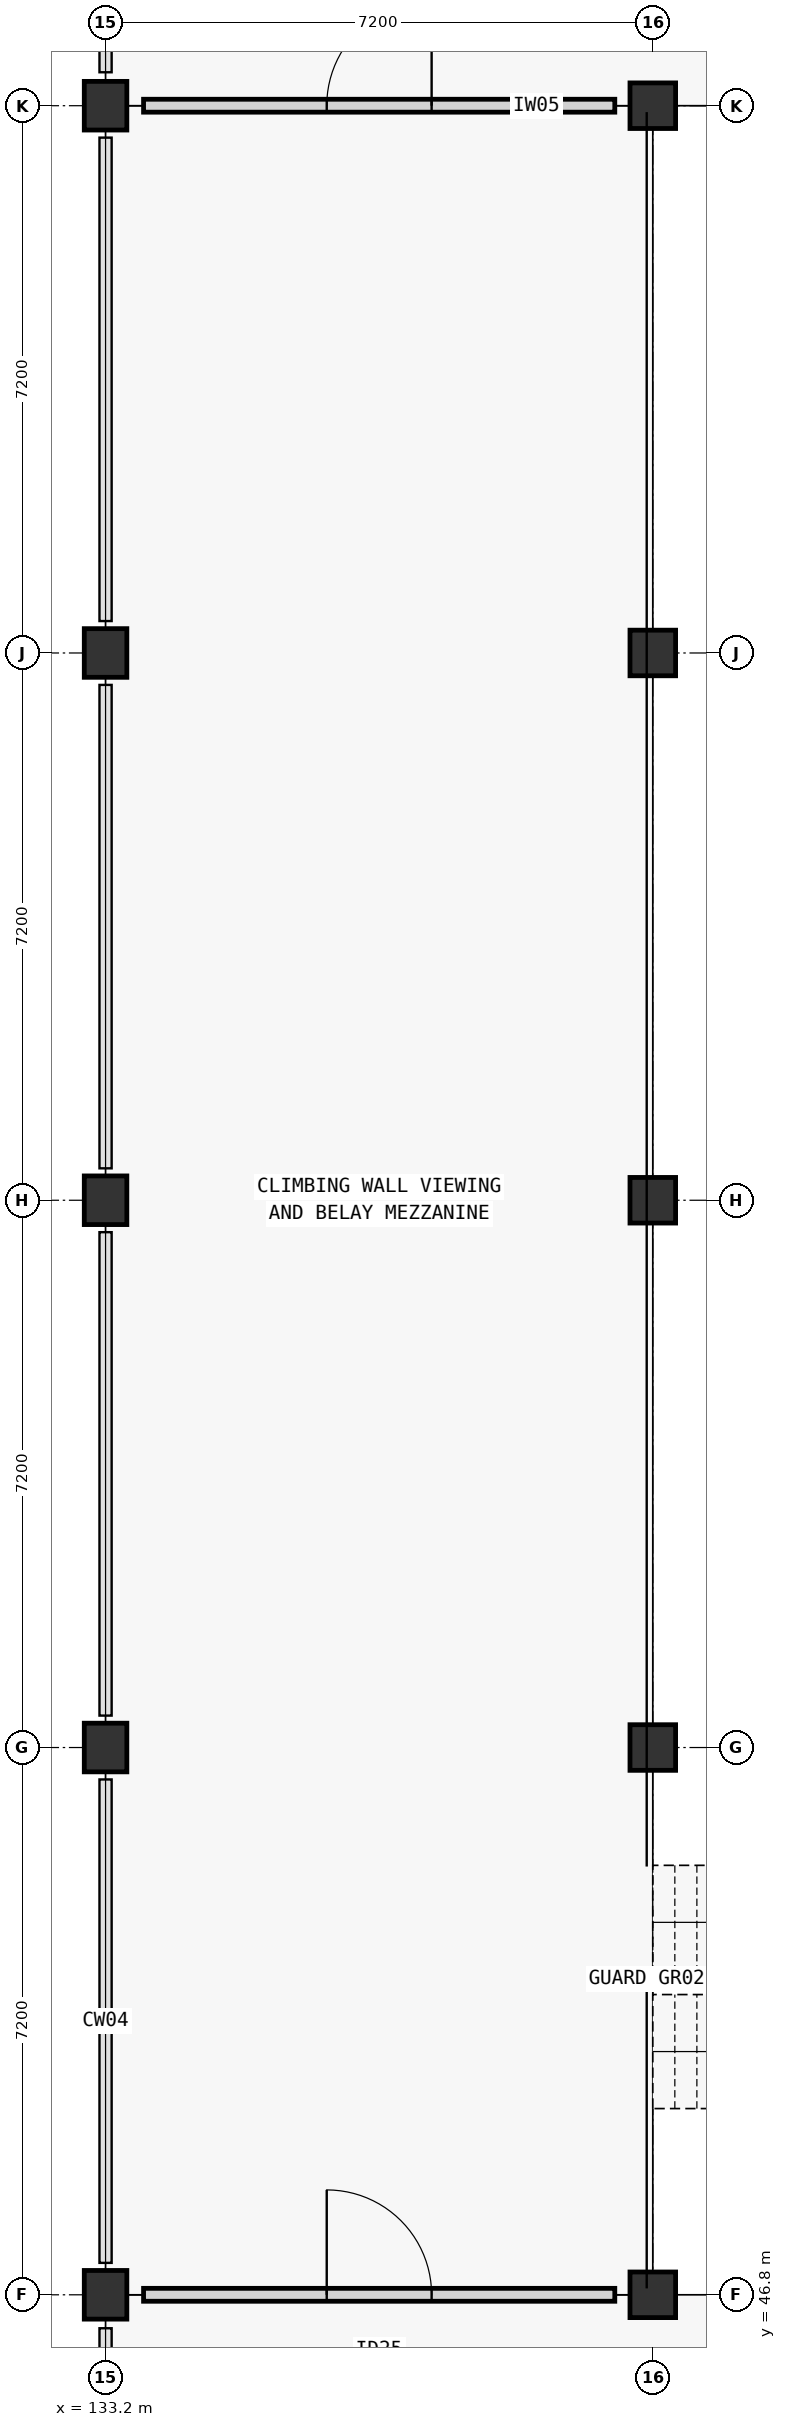
"""IFC4 building model, lengths in metres.
Left out: names, types, materials, properties, quantities, classifications, styles, units other than length and angle.
Written with IfcOpenShell. Run it as: python <this file> out.ifc"""

import sys

from ifc_helpers import new_model, si_unit, direction, frame, frame_2d, origin, origin_2d, place, context, subcontext, project, spatial, rectangle, extrude, element, fill, save


model = new_model("IFC4")
c1 = context("Model", 3, precision=1e-05, world=origin(), true_north=direction((0.0, 1.0)))
c2 = subcontext(c1, "Body", "Model", "MODEL_VIEW")
j1 = project(units=[si_unit("LENGTHUNIT", "METRE"), si_unit("PLANEANGLEUNIT", "RADIAN")], contexts=[c1])
p1 = place(None, origin())
s1 = spatial("IfcSite", under=j1, at=p1, CompositionType="ELEMENT")
p2 = place(p1, origin())
s2 = spatial("IfcBuilding", under=s1, at=p2, CompositionType="ELEMENT")
p3 = place(p2, frame((0.0, 0.0, 5.4)))
s3 = spatial("IfcBuildingStorey", under=s2, at=p3, CompositionType="ELEMENT", Elevation=5.4)
for number, where, z_axis, x_axis in (
    (1, (133.2, 46.8, 0.0), (0.0, 0.0, 1.0), (1.0, 0.0, 0.0)),
    (2, (133.2, 54.0, 0.0), (0.0, 0.0, 1.0), (1.0, 0.0, 0.0)),
    (3, (133.2, 61.2, 0.0), (0.0, 0.0, 1.0), (1.0, 0.0, 0.0)),
    (4, (133.2, 68.4, 0.0), (0.0, 0.0, 1.0), (1.0, 0.0, 0.0)),
    (5, (133.2, 75.6, 0.0), (0.0, 0.0, 1.0), (1.0, 0.0, 0.0)),
):
    element("IfcColumn", number, at=place(p3, frame(where, z_axis=z_axis, x_axis=x_axis)), inside=s3, PredefinedType="COLUMN", context=c2, shape_type="SweptSolid", body=[
        extrude(rectangle(XDim=0.56, YDim=0.64, at=origin_2d()), origin(), (0.0, 0.0, 1.0), 5.4),
    ])
for number, where, z_axis, x_axis in (
    (6, (140.4, 46.8, 0.0), (0.0, 0.0, 1.0), (1.0, 0.0, 0.0)),
    (7, (140.4, 54.0, 0.0), (0.0, 0.0, 1.0), (1.0, 0.0, 0.0)),
    (8, (140.4, 61.2, 0.0), (0.0, 0.0, 1.0), (1.0, 0.0, 0.0)),
    (9, (140.4, 68.4, 0.0), (0.0, 0.0, 1.0), (1.0, 0.0, 0.0)),
    (10, (140.4, 75.6, 0.0), (0.0, 0.0, 1.0), (1.0, 0.0, 0.0)),
):
    element("IfcColumn", number, at=place(p3, frame(where, z_axis=z_axis, x_axis=x_axis)), inside=s3, PredefinedType="COLUMN", context=c2, shape_type="SweptSolid", body=[
        extrude(rectangle(XDim=0.6, YDim=0.6, at=origin_2d()), origin(), (0.0, 0.0, 1.0), 5.4),
    ])
p4 = place(p3, frame((133.7, 46.8, 0.0), z_axis=(0.0, 0.0, 1.0), x_axis=(1.0, 0.0, 0.0)))
e11 = element("IfcWall", 11, at=p4, inside=s3, PredefinedType="STANDARD", context=c2, shape_type="SweptSolid", body=[
    extrude(rectangle(XDim=6.2, YDim=0.17, at=frame_2d((3.1, 0.0))), origin(), (0.0, 0.0, 1.0), 4.22),
])
p5 = place(p4, frame((2.41, 0.0, 0.0)))
e12 = element("IfcOpeningElement", 12, at=p5, cuts=e11, PredefinedType="OPENING", context=c2, shape_type="SweptSolid", body=[
    extrude(rectangle(XDim=1.38, YDim=2.2, at=frame_2d((0.69, 1.1))), frame((0.0, 0.085, 0.0), z_axis=(0.0, -1.0, 0.0), x_axis=(1.0, 0.0, 0.0)), (0.0, 0.0, 1.0), 0.17),
])
p6 = place(p3, frame((133.7, 75.6, 0.0), z_axis=(0.0, 0.0, 1.0), x_axis=(1.0, 0.0, 0.0)))
e13 = element("IfcWall", 13, at=p6, inside=s3, PredefinedType="STANDARD", context=c2, shape_type="SweptSolid", body=[
    extrude(rectangle(XDim=6.2, YDim=0.17, at=frame_2d((3.1, 0.0))), origin(), (0.0, 0.0, 1.0), 4.22),
])
p7 = place(p6, frame((2.41, 0.0, 0.0)))
e14 = element("IfcOpeningElement", 14, at=p7, cuts=e13, PredefinedType="OPENING", context=c2, shape_type="SweptSolid", body=[
    extrude(rectangle(XDim=1.38, YDim=2.2, at=frame_2d((0.69, 1.1))), frame((0.0, 0.085, 0.0), z_axis=(0.0, -1.0, 0.0), x_axis=(1.0, 0.0, 0.0)), (0.0, 0.0, 1.0), 0.17),
])
p8 = place(p5, origin())
e15 = element("IfcDoor", 15, at=p8, inside=s3, OperationType="SINGLE_SWING_LEFT", PredefinedType="DOOR", context=c2, shape_type="SweptSolid", body=[
    extrude(rectangle(XDim=1.38, YDim=2.2, at=frame_2d((0.69, 1.1))), frame((0.0, 0.025, 0.0), z_axis=(0.0, -1.0, 0.0), x_axis=(1.0, 0.0, 0.0)), (0.0, 0.0, 1.0), 0.05),
])
fill(e12, e15)
p9 = place(p7, origin())
e16 = element("IfcDoor", 16, at=p9, inside=s3, OperationType="SINGLE_SWING_RIGHT", PredefinedType="DOOR", context=c2, shape_type="SweptSolid", body=[
    extrude(rectangle(XDim=1.38, YDim=2.2, at=frame_2d((0.69, 1.1))), frame((0.0, 0.025, 0.0), z_axis=(0.0, -1.0, 0.0), x_axis=(1.0, 0.0, 0.0)), (0.0, 0.0, 1.0), 0.05),
])
fill(e14, e16)
save(model, sys.argv[1])
